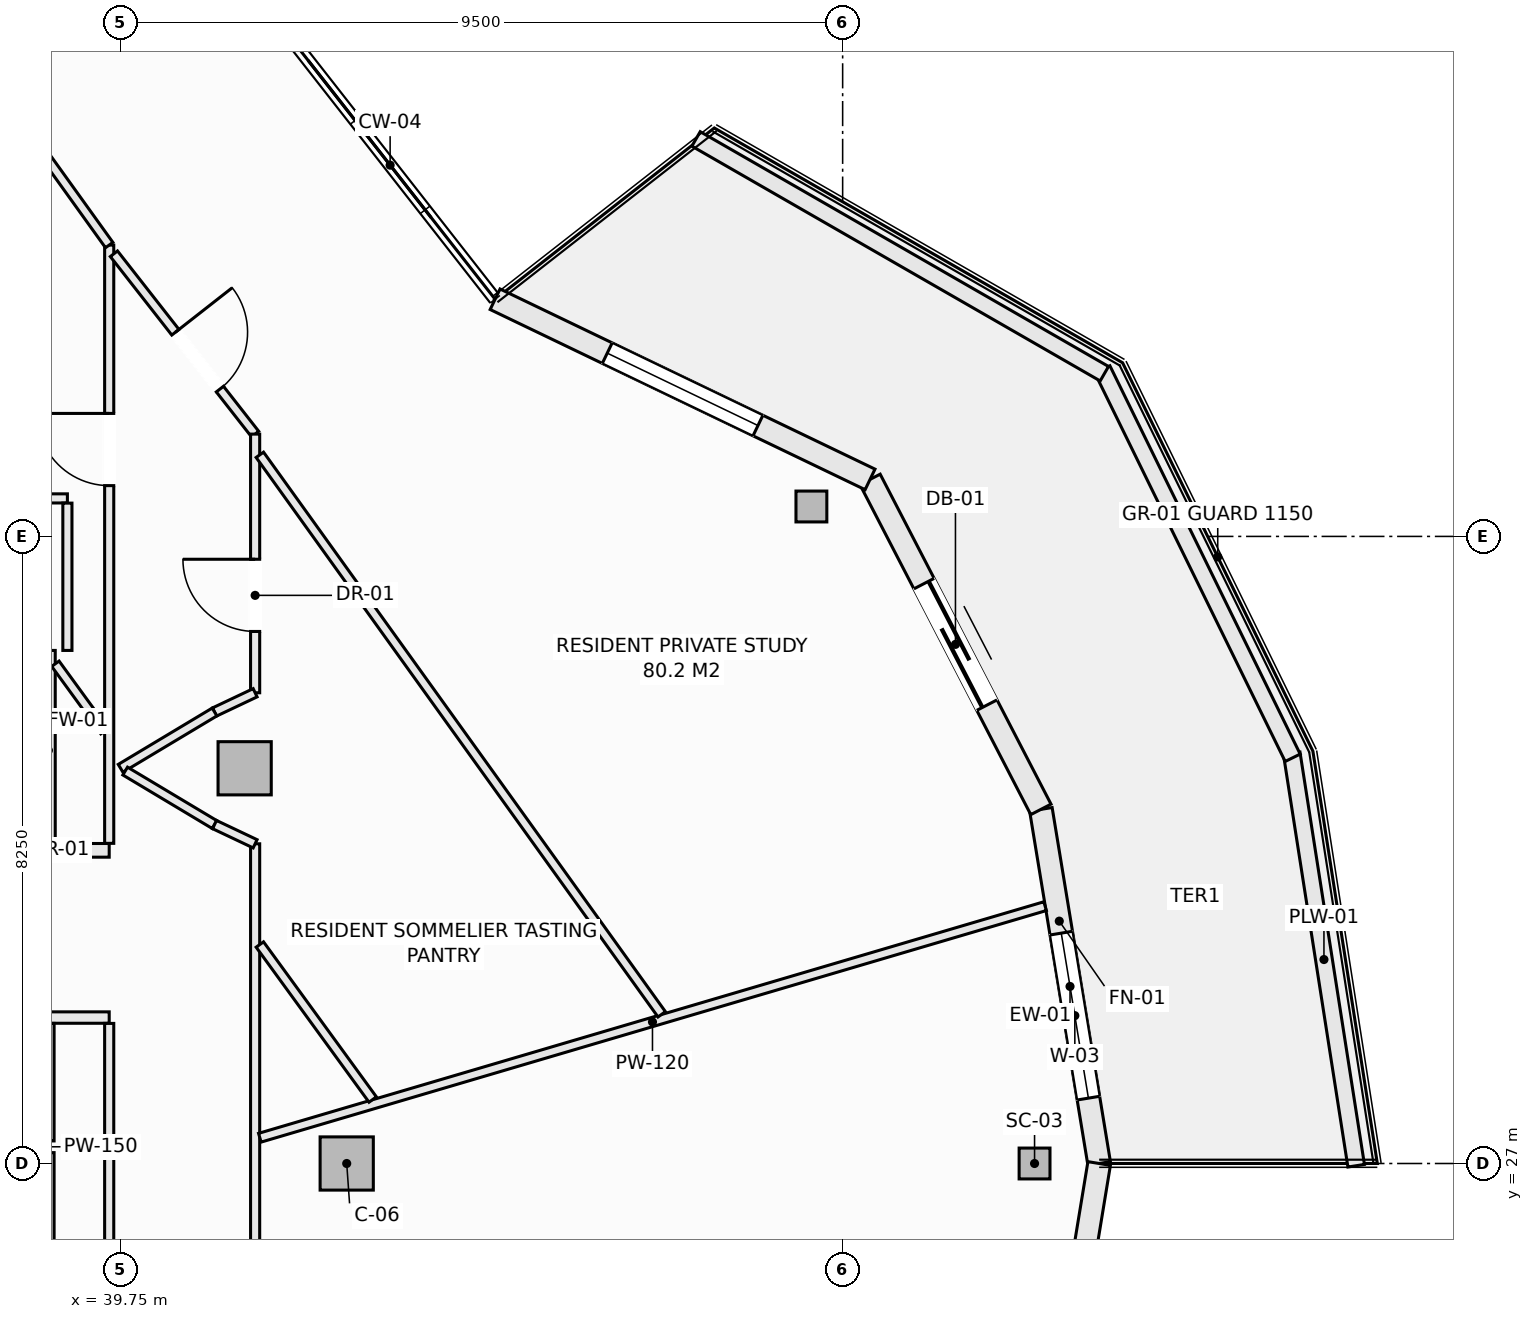
"""IFC4 building model, lengths in metres.
Left out: names, types, materials, properties, quantities, classifications, styles, units other than length and angle.
Written with IfcOpenShell. Run it as: python <this file> out.ifc"""

import sys

from ifc_helpers import new_model, si_unit, direction, frame, frame_2d, origin, origin_2d, place, context, subcontext, project, spatial, rectangle, hollow_rectangle, extrude, element, fill, save


model = new_model("IFC4")
c1 = context("Model", 3, precision=1e-05, world=origin(), true_north=direction((0.0, 1.0)))
c2 = subcontext(c1, "Body", "Model", "MODEL_VIEW")
j1 = project(units=[si_unit("LENGTHUNIT", "METRE"), si_unit("PLANEANGLEUNIT", "RADIAN")], contexts=[c1])
p1 = place(None, origin())
s1 = spatial("IfcSite", under=j1, at=p1, CompositionType="ELEMENT")
p2 = place(p1, origin())
s2 = spatial("IfcBuilding", under=s1, at=p2, CompositionType="ELEMENT")
p3 = place(p2, frame((0.0, 0.0, 245.9)))
s3 = spatial("IfcBuildingStorey", under=s2, at=p3, CompositionType="ELEMENT", Elevation=245.9)
for number, where, z_axis, x_axis in (
    (1, (51.775, 27.0, -0.27), (0.0, 0.0, 1.0), (1.0, 0.0, 0.0)),
    (2, (48.839, 35.644, -0.27), (0.0, 0.0, 1.0), (1.0, 0.0, 0.0)),
):
    element("IfcColumn", number, at=place(p3, frame(where, z_axis=z_axis, x_axis=x_axis)), inside=s3, PredefinedType="COLUMN", context=c2, shape_type="SweptSolid", body=[
        extrude(hollow_rectangle(XDim=0.406, YDim=0.406, WallThickness=0.016, at=origin_2d()), origin(), (0.0, 0.0, 1.0), 3.3),
    ])
for number, where, z_axis, x_axis in (
    (3, (42.725, 27.0, -0.27), (0.0, 0.0, 1.0), (1.0, 0.0, 0.0)),
    (4, (41.382, 32.199, -0.27), (0.0, 0.0, 1.0), (1.0, 0.0, 0.0)),
):
    element("IfcColumn", number, at=place(p3, frame(where, z_axis=z_axis, x_axis=x_axis)), inside=s3, PredefinedType="COLUMN", context=c2, shape_type="SweptSolid", body=[
        extrude(rectangle(XDim=0.7, YDim=0.7, at=origin_2d()), origin(), (0.0, 0.0, 1.0), 3.3),
    ])
p4 = place(p3, frame((51.858, 31.659, 0.0), z_axis=(0.0, 0.0, 1.0), x_axis=(0.162369371657, -0.986730047758, 0.0)))
e5 = element("IfcWall", 5, at=p4, inside=s3, PredefinedType="SOLIDWALL", context=c2, shape_type="SweptSolid", body=[
    extrude(rectangle(XDim=4.721, YDim=0.3, at=frame_2d((2.361, 0.0))), origin(), (0.0, 0.0, 1.0), 2.605),
])
p5 = place(p4, frame((1.65, 0.0, 0.72)))
e6 = element("IfcOpeningElement", 6, at=p5, cuts=e5, PredefinedType="OPENING", context=c2, shape_type="SweptSolid", body=[
    extrude(rectangle(XDim=2.2, YDim=1.65, at=frame_2d((1.1, 0.825))), frame((0.0, 0.16, 0.0), z_axis=(0.0, -1.0, 0.0), x_axis=(1.0, 0.0, 0.0)), (0.0, 0.0, 1.0), 0.32),
])
p6 = place(p3, frame((49.611, 36.0, 0.0), z_axis=(0.0, 0.0, 1.0), x_axis=(0.459793771602, -0.888025724625, 0.0)))
e7 = element("IfcWall", 7, at=p6, inside=s3, PredefinedType="SOLIDWALL", context=c2, shape_type="SweptSolid", body=[
    extrude(rectangle(XDim=4.889, YDim=0.3, at=frame_2d((2.444, 0.0))), origin(), (0.0, 0.0, 1.0), 2.605),
])
p7 = place(p6, frame((1.544, 0.0, 0.0)))
e8 = element("IfcOpeningElement", 8, at=p7, cuts=e7, PredefinedType="OPENING", context=c2, shape_type="SweptSolid", body=[
    extrude(rectangle(XDim=1.8, YDim=2.25, at=frame_2d((0.9, 1.125))), frame((0.0, 0.16, 0.0), z_axis=(0.0, -1.0, 0.0), x_axis=(1.0, 0.0, 0.0)), (0.0, 0.0, 1.0), 0.32),
])
p8 = place(p3, frame((44.677, 38.37, 0.0), z_axis=(0.0, 0.0, 1.0), x_axis=(0.901355238351, -0.433080517106, 0.0)))
e9 = element("IfcWall", 9, at=p8, inside=s3, PredefinedType="SOLIDWALL", context=c2, shape_type="SweptSolid", body=[
    extrude(rectangle(XDim=5.473, YDim=0.3, at=frame_2d((2.737, 0.0))), origin(), (0.0, 0.0, 1.0), 2.605),
])
p9 = place(p8, frame((1.637, 0.0, 0.72)))
e10 = element("IfcOpeningElement", 10, at=p9, cuts=e9, PredefinedType="OPENING", context=c2, shape_type="SweptSolid", body=[
    extrude(rectangle(XDim=2.2, YDim=1.65, at=frame_2d((1.1, 0.825))), frame((0.0, 0.16, 0.0), z_axis=(0.0, -1.0, 0.0), x_axis=(1.0, 0.0, 0.0)), (0.0, 0.0, 1.0), 0.32),
])
p10 = place(p3, frame((51.858, 22.341, 0.0), z_axis=(0.0, 0.0, 1.0), x_axis=(0.162369371657, 0.986730047758, 0.0)))
e11 = element("IfcWall", 11, at=p10, inside=s3, PredefinedType="SOLIDWALL", context=c2, shape_type="SweptSolid", body=[
    extrude(rectangle(XDim=4.721, YDim=0.3, at=frame_2d((2.361, 0.0))), origin(), (0.0, 0.0, 1.0), 2.605),
])
p11 = place(p10, frame((1.261, 0.0, 0.72)))
e12 = element("IfcOpeningElement", 12, at=p11, cuts=e11, PredefinedType="OPENING", context=c2, shape_type="SweptSolid", body=[
    extrude(rectangle(XDim=2.2, YDim=1.65, at=frame_2d((1.1, 0.825))), frame((0.0, 0.16, 0.0), z_axis=(0.0, -1.0, 0.0), x_axis=(1.0, 0.0, 0.0)), (0.0, 0.0, 1.0), 0.32),
])
p12 = place(p3, frame((55.158, 32.396, 0.0), z_axis=(0.0, 0.0, 1.0), x_axis=(0.154441975483, -0.988001860428, 0.0)))
e13 = element("IfcWall", 13, at=p12, inside=s3, PredefinedType="PARAPET", context=c2, shape_type="SweptSolid", body=[
    extrude(rectangle(XDim=5.492, YDim=0.22, at=frame_2d((2.746, 0.0))), origin(), (0.0, 0.0, 1.0), 0.52),
])
p13 = place(p3, frame((52.667, 37.447, 0.0), z_axis=(0.0, 0.0, 1.0), x_axis=(0.440058847499, -0.897968936399, 0.0)))
e14 = element("IfcWall", 14, at=p13, inside=s3, PredefinedType="PARAPET", context=c2, shape_type="SweptSolid", body=[
    extrude(rectangle(XDim=5.689, YDim=0.22, at=frame_2d((2.845, 0.0))), origin(), (0.0, 0.0, 1.0), 0.52),
])
p14 = place(p3, frame((47.321, 40.479, 0.0), z_axis=(0.0, 0.0, 1.0), x_axis=(0.866901621005, -0.49847926687, 0.0)))
e15 = element("IfcWall", 15, at=p14, inside=s3, PredefinedType="PARAPET", context=c2, shape_type="SweptSolid", body=[
    extrude(rectangle(XDim=6.197, YDim=0.22, at=frame_2d((3.098, 0.0))), origin(), (0.0, 0.0, 1.0), 0.52),
])
p15 = place(p3, frame((30.077, 28.92, 0.0), z_axis=(0.0, 0.0, 1.0), x_axis=(1.0, 0.0, 0.0)))
e16 = element("IfcWall", 16, at=p15, inside=s3, PredefinedType="PARTITIONING", context=c2, shape_type="SweptSolid", body=[
    extrude(rectangle(XDim=9.523, YDim=0.15, at=frame_2d((4.762, 0.0))), origin(), (0.0, 0.0, 1.0), 3.03),
])
p16 = place(p15, frame((1.342, 0.0, 0.0)))
e17 = element("IfcOpeningElement", 17, at=p16, cuts=e16, PredefinedType="OPENING", context=c2, shape_type="SweptSolid", body=[
    extrude(rectangle(XDim=0.95, YDim=2.1, at=frame_2d((0.475, 1.05))), frame((0.0, 0.085, 0.0), z_axis=(0.0, -1.0, 0.0), x_axis=(1.0, 0.0, 0.0)), (0.0, 0.0, 1.0), 0.17),
])
p17 = place(p15, frame((5.498, 0.0, 0.0)))
e18 = element("IfcOpeningElement", 18, at=p17, cuts=e16, PredefinedType="OPENING", context=c2, shape_type="SweptSolid", body=[
    extrude(rectangle(XDim=0.95, YDim=2.1, at=frame_2d((0.475, 1.05))), frame((0.0, 0.085, 0.0), z_axis=(0.0, -1.0, 0.0), x_axis=(1.0, 0.0, 0.0)), (0.0, 0.0, 1.0), 0.17),
])
p18 = place(p3, frame((38.8, 25.197, 0.0), z_axis=(0.0, 0.0, 1.0), x_axis=(0.0, 1.0, 0.0)))
e19 = element("IfcWall", 19, at=p18, inside=s3, PredefinedType="PARTITIONING", context=c2, shape_type="SweptSolid", body=[
    extrude(rectangle(XDim=1.946, YDim=0.15, at=frame_2d((0.973, 0.0))), origin(), (0.0, 0.0, 1.0), 3.03),
])
p19 = place(p3, frame((38.8, 27.297, 0.0), z_axis=(0.0, 0.0, 1.0), x_axis=(0.0, 1.0, 0.0)))
e20 = element("IfcWall", 20, at=p19, inside=s3, PredefinedType="PARTITIONING", context=c2, shape_type="SweptSolid", body=[
    extrude(rectangle(XDim=1.546, YDim=0.15, at=frame_2d((0.773, 0.0))), origin(), (0.0, 0.0, 1.0), 3.03),
])
p20 = place(p3, frame((38.8, 31.12, 0.0), z_axis=(0.0, 0.0, 1.0), x_axis=(0.0, 1.0, 0.0)))
e21 = element("IfcWall", 21, at=p20, inside=s3, PredefinedType="SOLIDWALL", context=c2, shape_type="SweptSolid", body=[
    extrude(rectangle(XDim=2.63, YDim=0.18, at=frame_2d((1.315, 0.0))), origin(), (0.0, 0.0, 1.0), 3.03),
])
p21 = place(p3, frame((38.892, 31.12, 0.0), z_axis=(0.0, 0.0, 1.0), x_axis=(1.0, 0.0, 0.0)))
e22 = element("IfcWall", 22, at=p21, inside=s3, PredefinedType="SOLIDWALL", context=c2, shape_type="SweptSolid", body=[
    extrude(rectangle(XDim=0.708, YDim=0.18, at=frame_2d((0.354, 0.0))), origin(), (0.0, 0.0, 1.0), 3.03),
])
p22 = place(p3, frame((33.913, 35.75, 0.0), z_axis=(0.0, 0.0, 1.0), x_axis=(1.0, 0.0, 0.0)))
e23 = element("IfcWall", 23, at=p22, inside=s3, PredefinedType="PARTITIONING", context=c2, shape_type="SweptSolid", body=[
    extrude(rectangle(XDim=5.137, YDim=0.12, at=frame_2d((2.568, 0.0))), origin(), (0.0, 0.0, 1.0), 2.478),
])
p23 = place(p3, frame((39.05, 33.75, 0.0), z_axis=(0.0, 0.0, 1.0), x_axis=(0.0, 1.0, 0.0)))
e24 = element("IfcWall", 24, at=p23, inside=s3, PredefinedType="PARTITIONING", context=c2, shape_type="SweptSolid", body=[
    extrude(rectangle(XDim=1.938, YDim=0.12, at=frame_2d((0.969, 0.0))), origin(), (0.0, 0.0, 1.0), 3.03),
])
p24 = place(p3, frame((39.6, 25.197, 0.0), z_axis=(0.0, 0.0, 1.0), x_axis=(0.0, 1.0, 0.0)))
e25 = element("IfcWall", 25, at=p24, inside=s3, PredefinedType="PARTITIONING", context=c2, shape_type="SweptSolid", body=[
    extrude(rectangle(XDim=3.646, YDim=0.12, at=frame_2d((1.823, 0.0))), origin(), (0.0, 0.0, 1.0), 3.03),
])
p25 = place(p3, frame((39.6, 31.212, 0.0), z_axis=(0.0, 0.0, 1.0), x_axis=(0.0, 1.0, 0.0)))
e26 = element("IfcWall", 26, at=p25, inside=s3, PredefinedType="PARTITIONING", context=c2, shape_type="SweptSolid", body=[
    extrude(rectangle(XDim=7.871, YDim=0.12, at=frame_2d((3.936, 0.0))), origin(), (0.0, 0.0, 1.0), 3.03),
])
p26 = place(p25, frame((4.706, 0.0, 0.0)))
e27 = element("IfcOpeningElement", 27, at=p26, cuts=e26, PredefinedType="OPENING", context=c2, shape_type="SweptSolid", body=[
    extrude(rectangle(XDim=0.95, YDim=2.1, at=frame_2d((0.475, 1.05))), frame((0.0, 0.07, 0.0), z_axis=(0.0, -1.0, 0.0), x_axis=(1.0, 0.0, 0.0)), (0.0, 0.0, 1.0), 0.14),
])
p27 = place(p3, frame((39.662, 38.969, 0.0), z_axis=(0.0, 0.0, 1.0), x_axis=(0.616500468458, -0.787354540465, 0.0)))
e28 = element("IfcWall", 28, at=p27, inside=s3, PredefinedType="PARTITIONING", context=c2, shape_type="SweptSolid", body=[
    extrude(rectangle(XDim=3.014, YDim=0.12, at=frame_2d((1.507, 0.0))), origin(), (0.0, 0.0, 1.0), 3.03),
])
p28 = place(p27, frame((1.312, 0.0, 0.0)))
e29 = element("IfcOpeningElement", 29, at=p28, cuts=e28, PredefinedType="OPENING", context=c2, shape_type="SweptSolid", body=[
    extrude(rectangle(XDim=0.95, YDim=2.1, at=frame_2d((0.475, 1.05))), frame((0.0, 0.07, 0.0), z_axis=(0.0, -1.0, 0.0), x_axis=(1.0, 0.0, 0.0)), (0.0, 0.0, 1.0), 0.14),
])
p29 = place(p3, frame((41.52, 22.794, 0.0), z_axis=(0.0, 0.0, 1.0), x_axis=(0.0, 1.0, 0.0)))
e30 = element("IfcWall", 30, at=p29, inside=s3, PredefinedType="PARTITIONING", context=c2, shape_type="SweptSolid", body=[
    extrude(rectangle(XDim=8.412, YDim=0.12, at=frame_2d((4.206, 0.0))), origin(), (0.0, 0.0, 1.0), 2.478),
])
p30 = place(p29, frame((1.999, 0.0, 0.0)))
e31 = element("IfcOpeningElement", 31, at=p30, cuts=e30, PredefinedType="OPENING", context=c2, shape_type="SweptSolid", body=[
    extrude(rectangle(XDim=0.95, YDim=2.1, at=frame_2d((0.475, 1.05))), frame((0.0, 0.07, 0.0), z_axis=(0.0, -1.0, 0.0), x_axis=(1.0, 0.0, 0.0)), (0.0, 0.0, 1.0), 0.14),
])
p31 = place(p3, frame((41.52, 33.193, 0.0), z_axis=(0.0, 0.0, 1.0), x_axis=(0.0, 1.0, 0.0)))
e32 = element("IfcWall", 32, at=p31, inside=s3, PredefinedType="PARTITIONING", context=c2, shape_type="SweptSolid", body=[
    extrude(rectangle(XDim=3.403, YDim=0.12, at=frame_2d((1.701, 0.0))), origin(), (0.0, 0.0, 1.0), 3.03),
])
p32 = place(p31, frame((0.806, 0.0, 0.0)))
e33 = element("IfcOpeningElement", 33, at=p32, cuts=e32, PredefinedType="OPENING", context=c2, shape_type="SweptSolid", body=[
    extrude(rectangle(XDim=0.95, YDim=2.1, at=frame_2d((0.475, 1.05))), frame((0.0, 0.07, 0.0), z_axis=(0.0, -1.0, 0.0), x_axis=(1.0, 0.0, 0.0)), (0.0, 0.0, 1.0), 0.14),
])
p33 = place(p3, frame((40.986, 32.94, 0.0), z_axis=(0.0, 0.0, 1.0), x_axis=(0.90356951601, 0.428441512621, 0.0)))
e34 = element("IfcWall", 34, at=p33, inside=s3, PredefinedType="PARTITIONING", context=c2, shape_type="SweptSolid", body=[
    extrude(rectangle(XDim=0.591, YDim=0.12, at=frame_2d((0.295, 0.0))), origin(), (0.0, 0.0, 1.0), 3.03),
])
p34 = place(p3, frame((39.75, 32.199, 0.0), z_axis=(0.0, 0.0, 1.0), x_axis=(0.857702120906, 0.514146935996, 0.0)))
e35 = element("IfcWall", 35, at=p34, inside=s3, PredefinedType="PARTITIONING", context=c2, shape_type="SweptSolid", body=[
    extrude(rectangle(XDim=1.441, YDim=0.12, at=frame_2d((0.721, 0.0))), origin(), (0.0, 0.0, 1.0), 3.03),
])
p35 = place(p3, frame((39.81, 32.163, 0.0), z_axis=(0.0, 0.0, 1.0), x_axis=(0.858011245414, -0.513630901273, 0.0)))
e36 = element("IfcWall", 36, at=p35, inside=s3, PredefinedType="PARTITIONING", context=c2, shape_type="SweptSolid", body=[
    extrude(rectangle(XDim=1.37, YDim=0.12, at=frame_2d((0.685, 0.0))), origin(), (0.0, 0.0, 1.0), 3.03),
])
p36 = place(p3, frame((40.986, 31.459, 0.0), z_axis=(0.0, 0.0, 1.0), x_axis=(0.903729424576, -0.428104107847, 0.0)))
e37 = element("IfcWall", 37, at=p36, inside=s3, PredefinedType="PARTITIONING", context=c2, shape_type="SweptSolid", body=[
    extrude(rectangle(XDim=0.591, YDim=0.12, at=frame_2d((0.295, 0.0))), origin(), (0.0, 0.0, 1.0), 3.03),
])
p37 = place(p3, frame((41.582, 27.339, 0.0), z_axis=(0.0, 0.0, 1.0), x_axis=(0.959173635638, 0.282817850741, 0.0)))
e38 = element("IfcWall", 38, at=p37, inside=s3, PredefinedType="PARTITIONING", context=c2, shape_type="SweptSolid", body=[
    extrude(rectangle(XDim=10.771, YDim=0.12, at=frame_2d((5.386, 0.0))), origin(), (0.0, 0.0, 1.0), 3.03),
])
p38 = place(p3, frame((38.892, 33.575, 0.0), z_axis=(0.0, 0.0, 1.0), x_axis=(0.5886213307, -0.808408887287, 0.0)))
e39 = element("IfcWall", 39, at=p38, inside=s3, PredefinedType="PARTITIONING", context=c2, shape_type="SweptSolid", body=[
    extrude(rectangle(XDim=1.097, YDim=0.12, at=frame_2d((0.549, 0.0))), origin(), (0.0, 0.0, 1.0), 3.03),
])
p39 = place(p3, frame((41.582, 29.881, 0.0), z_axis=(0.0, 0.0, 1.0), x_axis=(0.588620460465, -0.808409520925, 0.0)))
e40 = element("IfcWall", 40, at=p39, inside=s3, PredefinedType="PARTITIONING", context=c2, shape_type="SweptSolid", body=[
    extrude(rectangle(XDim=2.523, YDim=0.12, at=frame_2d((1.261, 0.0))), origin(), (0.0, 0.0, 1.0), 2.478),
])
p40 = place(p3, frame((35.896, 44.24, 0.0), z_axis=(0.0, 0.0, 1.0), x_axis=(0.583414962814, -0.812174230793, 0.0)))
e41 = element("IfcWall", 41, at=p40, inside=s3, PredefinedType="PARTITIONING", context=c2, shape_type="SweptSolid", body=[
    extrude(rectangle(XDim=6.349, YDim=0.12, at=frame_2d((3.175, 0.0))), origin(), (0.0, 0.0, 1.0), 3.03),
])
p41 = place(p3, frame((41.582, 36.324, 0.0), z_axis=(0.0, 0.0, 1.0), x_axis=(0.583386800507, -0.812194460086, 0.0)))
e42 = element("IfcWall", 42, at=p41, inside=s3, PredefinedType="PARTITIONING", context=c2, shape_type="SweptSolid", body=[
    extrude(rectangle(XDim=9.063, YDim=0.12, at=frame_2d((4.532, 0.0))), origin(), (0.0, 0.0, 1.0), 3.03),
])
p42 = place(p5, origin())
e43 = element("IfcWindow", 43, at=p42, inside=s3, PartitioningType="SINGLE_PANEL", PredefinedType="WINDOW", context=c2, shape_type="SweptSolid", body=[
    extrude(rectangle(XDim=2.2, YDim=1.65, at=frame_2d((1.1, 0.825))), frame((0.0, 0.03, 0.0), z_axis=(0.0, -1.0, 0.0), x_axis=(1.0, 0.0, 0.0)), (0.0, 0.0, 1.0), 0.06),
])
fill(e6, e43)
p43 = place(p7, origin())
e44 = element("IfcDoor", 44, at=p43, inside=s3, OperationType="SLIDING_TO_LEFT", PredefinedType="DOOR", context=c2, shape_type="SweptSolid", body=[
    extrude(rectangle(XDim=1.8, YDim=2.25, at=frame_2d((0.9, 1.125))), frame((0.0, 0.025, 0.0), z_axis=(0.0, -1.0, 0.0), x_axis=(1.0, 0.0, 0.0)), (0.0, 0.0, 1.0), 0.05),
])
fill(e8, e44)
p44 = place(p9, origin())
e45 = element("IfcWindow", 45, at=p44, inside=s3, PartitioningType="SINGLE_PANEL", PredefinedType="WINDOW", context=c2, shape_type="SweptSolid", body=[
    extrude(rectangle(XDim=2.2, YDim=1.65, at=frame_2d((1.1, 0.825))), frame((0.0, 0.03, 0.0), z_axis=(0.0, -1.0, 0.0), x_axis=(1.0, 0.0, 0.0)), (0.0, 0.0, 1.0), 0.06),
])
fill(e10, e45)
p45 = place(p32, origin())
e46 = element("IfcDoor", 46, at=p45, inside=s3, OperationType="SINGLE_SWING_RIGHT", PredefinedType="DOOR", context=c2, shape_type="SweptSolid", body=[
    extrude(rectangle(XDim=0.95, YDim=2.1, at=frame_2d((0.475, 1.05))), frame((0.0, 0.025, 0.0), z_axis=(0.0, -1.0, 0.0), x_axis=(1.0, 0.0, 0.0)), (0.0, 0.0, 1.0), 0.05),
])
fill(e33, e46)
p46 = place(p28, origin())
e47 = element("IfcDoor", 47, at=p46, inside=s3, OperationType="SINGLE_SWING_LEFT", PredefinedType="DOOR", context=c2, shape_type="SweptSolid", body=[
    extrude(rectangle(XDim=0.95, YDim=2.1, at=frame_2d((0.475, 1.05))), frame((0.0, 0.025, 0.0), z_axis=(0.0, -1.0, 0.0), x_axis=(1.0, 0.0, 0.0)), (0.0, 0.0, 1.0), 0.05),
])
fill(e29, e47)
p47 = place(p26, origin())
e48 = element("IfcDoor", 48, at=p47, inside=s3, OperationType="SINGLE_SWING_RIGHT", PredefinedType="DOOR", context=c2, shape_type="SweptSolid", body=[
    extrude(rectangle(XDim=0.95, YDim=2.1, at=frame_2d((0.475, 1.05))), frame((0.0, 0.025, 0.0), z_axis=(0.0, -1.0, 0.0), x_axis=(1.0, 0.0, 0.0)), (0.0, 0.0, 1.0), 0.05),
])
fill(e27, e48)
save(model, sys.argv[1])
